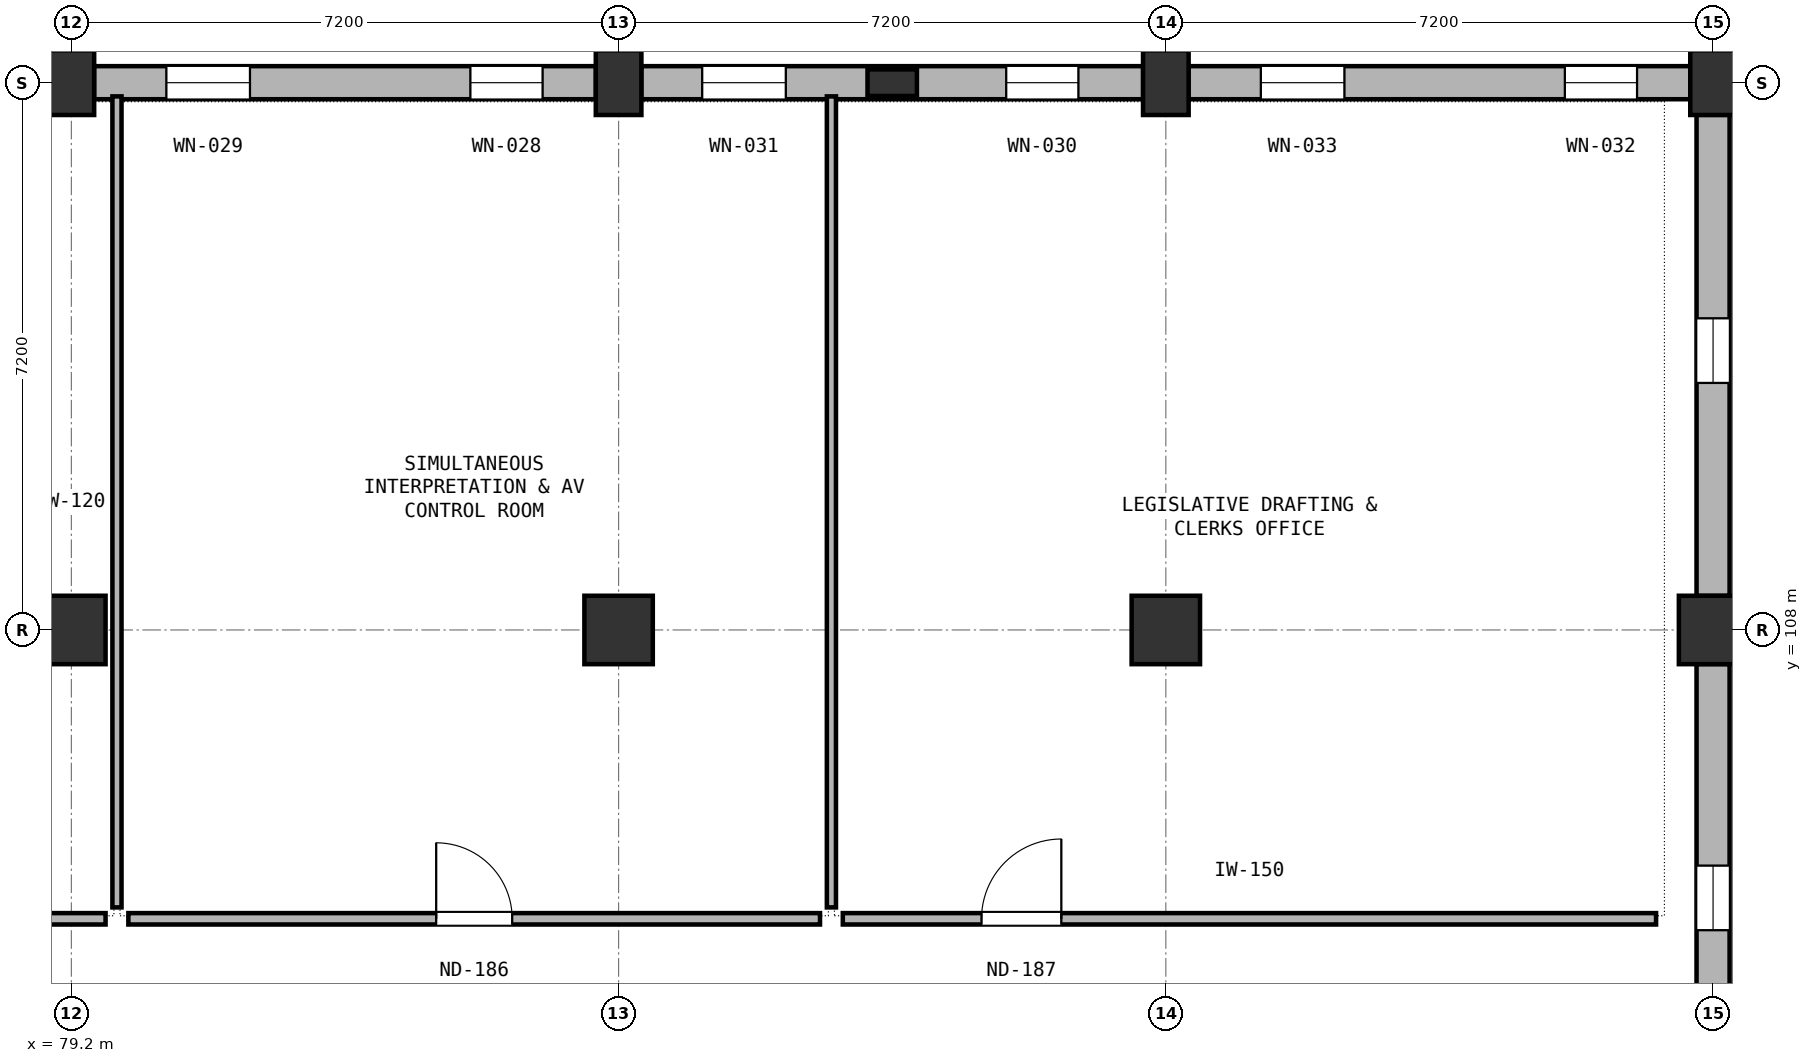
"""IFC4 building model, lengths in metres.
Left out: names, types, materials, properties, quantities, classifications, styles, units other than length and angle.
Written with IfcOpenShell. Run it as: python <this file> out.ifc"""

import sys

from ifc_helpers import new_model, si_unit, direction, frame, frame_2d, origin, origin_2d, place, context, subcontext, project, spatial, rectangle, extrude, element, fill, save


model = new_model("IFC4")
c1 = context("Model", 3, precision=1e-05, world=origin(), true_north=direction((0.0, 1.0)))
c2 = subcontext(c1, "Body", "Model", "MODEL_VIEW")
j1 = project(units=[si_unit("LENGTHUNIT", "METRE"), si_unit("PLANEANGLEUNIT", "RADIAN")], contexts=[c1])
p1 = place(None, origin())
s1 = spatial("IfcSite", under=j1, at=p1, CompositionType="ELEMENT")
p2 = place(p1, origin())
s2 = spatial("IfcBuilding", under=s1, at=p2, CompositionType="ELEMENT")
p3 = place(p2, frame((0.0, 0.0, 5.4)))
s3 = spatial("IfcBuildingStorey", under=s2, at=p3, CompositionType="ELEMENT", Elevation=5.4)
p4 = place(p3, frame((79.2, 108.0, 0.0), z_axis=(0.0, 0.0, 1.0), x_axis=(1.0, 0.0, 0.0)))
e1 = element("IfcColumn", 1, at=p4, inside=s3, PredefinedType="COLUMN", context=c2, shape_type="SweptSolid", body=[
    extrude(rectangle(XDim=0.9, YDim=0.9, at=origin_2d()), origin(), (0.0, 0.0, 1.0), 4.8),
])
p5 = place(p3, frame((79.2, 115.2, 0.0), z_axis=(0.0, 0.0, 1.0), x_axis=(1.0, 0.0, 0.0)))
e2 = element("IfcColumn", 2, at=p5, inside=s3, PredefinedType="COLUMN", context=c2, shape_type="SweptSolid", body=[
    extrude(rectangle(XDim=0.6, YDim=0.85, at=origin_2d()), origin(), (0.0, 0.0, 1.0), 4.8),
])
p6 = place(p3, frame((86.4, 108.0, 0.0), z_axis=(0.0, 0.0, 1.0), x_axis=(1.0, 0.0, 0.0)))
e3 = element("IfcColumn", 3, at=p6, inside=s3, PredefinedType="COLUMN", context=c2, shape_type="SweptSolid", body=[
    extrude(rectangle(XDim=0.9, YDim=0.9, at=origin_2d()), origin(), (0.0, 0.0, 1.0), 4.8),
])
p7 = place(p3, frame((86.4, 115.2, 0.0), z_axis=(0.0, 0.0, 1.0), x_axis=(1.0, 0.0, 0.0)))
e4 = element("IfcColumn", 4, at=p7, inside=s3, PredefinedType="COLUMN", context=c2, shape_type="SweptSolid", body=[
    extrude(rectangle(XDim=0.6, YDim=0.85, at=origin_2d()), origin(), (0.0, 0.0, 1.0), 4.8),
])
p8 = place(p3, frame((93.6, 108.0, 0.0), z_axis=(0.0, 0.0, 1.0), x_axis=(1.0, 0.0, 0.0)))
e5 = element("IfcColumn", 5, at=p8, inside=s3, PredefinedType="COLUMN", context=c2, shape_type="SweptSolid", body=[
    extrude(rectangle(XDim=0.9, YDim=0.9, at=origin_2d()), origin(), (0.0, 0.0, 1.0), 4.8),
])
p9 = place(p3, frame((93.6, 115.2, 0.0), z_axis=(0.0, 0.0, 1.0), x_axis=(1.0, 0.0, 0.0)))
e6 = element("IfcColumn", 6, at=p9, inside=s3, PredefinedType="COLUMN", context=c2, shape_type="SweptSolid", body=[
    extrude(rectangle(XDim=0.6, YDim=0.85, at=origin_2d()), origin(), (0.0, 0.0, 1.0), 4.8),
])
p10 = place(p3, frame((100.8, 108.0, 0.0), z_axis=(0.0, 0.0, 1.0), x_axis=(1.0, 0.0, 0.0)))
e7 = element("IfcColumn", 7, at=p10, inside=s3, PredefinedType="COLUMN", context=c2, shape_type="SweptSolid", body=[
    extrude(rectangle(XDim=0.9, YDim=0.9, at=origin_2d()), origin(), (0.0, 0.0, 1.0), 4.8),
])
p11 = place(p3, frame((100.8, 115.2, 0.0), z_axis=(0.0, 0.0, 1.0), x_axis=(1.0, 0.0, 0.0)))
e8 = element("IfcColumn", 8, at=p11, inside=s3, PredefinedType="COLUMN", context=c2, shape_type="SweptSolid", body=[
    extrude(rectangle(XDim=0.6, YDim=0.85, at=origin_2d()), origin(), (0.0, 0.0, 1.0), 4.8),
])
p12 = place(p3, frame((90.0, 115.2, 0.0), z_axis=(0.0, 0.0, 1.0), x_axis=(1.0, 0.0, 0.0)))
e9 = element("IfcColumn", 9, at=p12, inside=s3, PredefinedType="PILASTER", context=c2, shape_type="SweptSolid", body=[
    extrude(rectangle(XDim=0.65, YDim=0.35, at=origin_2d()), origin(), (0.0, 0.0, 1.0), 4.8),
])
p13 = place(p3, frame((86.102, 115.2, 0.0), z_axis=(0.0, 0.0, 1.0), x_axis=(-1.0, 0.0, 0.0)))
e10 = element("IfcWall", 10, at=p13, inside=s3, PredefinedType="SOLIDWALL", context=c2, shape_type="SweptSolid", body=[
    extrude(rectangle(XDim=6.604, YDim=0.435, at=frame_2d((3.302, 0.0))), origin(), (0.0, 0.0, 1.0), 3.5),
])
p14 = place(p13, frame((0.702, 0.0, 0.7)))
e11 = element("IfcOpeningElement", 11, at=p14, cuts=e10, PredefinedType="OPENING", context=c2, shape_type="SweptSolid", body=[
    extrude(rectangle(XDim=0.95, YDim=2.6, at=frame_2d((0.475, 1.3))), frame((0.0, 0.228, 0.0), z_axis=(0.0, -1.0, 0.0), x_axis=(1.0, 0.0, 0.0)), (0.0, 0.0, 1.0), 0.455),
])
p15 = place(p13, frame((4.552, 0.0, 0.7)))
e12 = element("IfcOpeningElement", 12, at=p15, cuts=e10, PredefinedType="OPENING", context=c2, shape_type="SweptSolid", body=[
    extrude(rectangle(XDim=1.1, YDim=2.6, at=frame_2d((0.55, 1.3))), frame((0.0, 0.228, 0.0), z_axis=(0.0, -1.0, 0.0), x_axis=(1.0, 0.0, 0.0)), (0.0, 0.0, 1.0), 0.455),
])
p16 = place(p3, frame((93.302, 115.2, 0.0), z_axis=(0.0, 0.0, 1.0), x_axis=(-1.0, 0.0, 0.0)))
e13 = element("IfcWall", 13, at=p16, inside=s3, PredefinedType="SOLIDWALL", context=c2, shape_type="SweptSolid", body=[
    extrude(rectangle(XDim=6.604, YDim=0.435, at=frame_2d((3.302, 0.0))), origin(), (0.0, 0.0, 1.0), 3.5),
])
p17 = place(p16, frame((0.852, 0.0, 0.7)))
e14 = element("IfcOpeningElement", 14, at=p17, cuts=e13, PredefinedType="OPENING", context=c2, shape_type="SweptSolid", body=[
    extrude(rectangle(XDim=0.95, YDim=2.6, at=frame_2d((0.475, 1.3))), frame((0.0, 0.228, 0.0), z_axis=(0.0, -1.0, 0.0), x_axis=(1.0, 0.0, 0.0)), (0.0, 0.0, 1.0), 0.455),
])
p18 = place(p16, frame((4.702, 0.0, 0.7)))
e15 = element("IfcOpeningElement", 15, at=p18, cuts=e13, PredefinedType="OPENING", context=c2, shape_type="SweptSolid", body=[
    extrude(rectangle(XDim=1.1, YDim=2.6, at=frame_2d((0.55, 1.3))), frame((0.0, 0.228, 0.0), z_axis=(0.0, -1.0, 0.0), x_axis=(1.0, 0.0, 0.0)), (0.0, 0.0, 1.0), 0.455),
])
p19 = place(p3, frame((100.502, 115.2, 0.0), z_axis=(0.0, 0.0, 1.0), x_axis=(-1.0, 0.0, 0.0)))
e16 = element("IfcWall", 16, at=p19, inside=s3, PredefinedType="SOLIDWALL", context=c2, shape_type="SweptSolid", body=[
    extrude(rectangle(XDim=6.604, YDim=0.435, at=frame_2d((3.302, 0.0))), origin(), (0.0, 0.0, 1.0), 3.5),
])
p20 = place(p19, frame((0.702, 0.0, 0.7)))
e17 = element("IfcOpeningElement", 17, at=p20, cuts=e16, PredefinedType="OPENING", context=c2, shape_type="SweptSolid", body=[
    extrude(rectangle(XDim=0.95, YDim=2.6, at=frame_2d((0.475, 1.3))), frame((0.0, 0.228, 0.0), z_axis=(0.0, -1.0, 0.0), x_axis=(1.0, 0.0, 0.0)), (0.0, 0.0, 1.0), 0.455),
])
p21 = place(p19, frame((4.552, 0.0, 0.7)))
e18 = element("IfcOpeningElement", 18, at=p21, cuts=e16, PredefinedType="OPENING", context=c2, shape_type="SweptSolid", body=[
    extrude(rectangle(XDim=1.1, YDim=2.6, at=frame_2d((0.55, 1.3))), frame((0.0, 0.228, 0.0), z_axis=(0.0, -1.0, 0.0), x_axis=(1.0, 0.0, 0.0)), (0.0, 0.0, 1.0), 0.455),
])
p22 = place(p3, frame((100.8, 107.552, 0.0), z_axis=(0.0, 0.0, 1.0), x_axis=(0.0, -1.0, 0.0)))
e19 = element("IfcWall", 19, at=p22, inside=s3, PredefinedType="SOLIDWALL", context=c2, shape_type="SweptSolid", body=[
    extrude(rectangle(XDim=6.304, YDim=0.435, at=frame_2d((3.152, 0.0))), origin(), (0.0, 0.0, 1.0), 3.5),
])
p23 = place(p22, frame((2.652, 0.0, 0.7)))
e20 = element("IfcOpeningElement", 20, at=p23, cuts=e19, PredefinedType="OPENING", context=c2, shape_type="SweptSolid", body=[
    extrude(rectangle(XDim=0.85, YDim=2.2, at=frame_2d((0.425, 1.1))), frame((0.0, 0.228, 0.0), z_axis=(0.0, -1.0, 0.0), x_axis=(1.0, 0.0, 0.0)), (0.0, 0.0, 1.0), 0.455),
])
p24 = place(p3, frame((100.8, 114.777, 0.0), z_axis=(0.0, 0.0, 1.0), x_axis=(0.0, -1.0, 0.0)))
e21 = element("IfcWall", 21, at=p24, inside=s3, PredefinedType="SOLIDWALL", context=c2, shape_type="SweptSolid", body=[
    extrude(rectangle(XDim=6.329, YDim=0.435, at=frame_2d((3.165, 0.0))), origin(), (0.0, 0.0, 1.0), 3.5),
])
p25 = place(p24, frame((2.677, 0.0, 0.7)))
e22 = element("IfcOpeningElement", 22, at=p25, cuts=e21, PredefinedType="OPENING", context=c2, shape_type="SweptSolid", body=[
    extrude(rectangle(XDim=0.85, YDim=2.2, at=frame_2d((0.425, 1.1))), frame((0.0, 0.228, 0.0), z_axis=(0.0, -1.0, 0.0), x_axis=(1.0, 0.0, 0.0)), (0.0, 0.0, 1.0), 0.455),
])
p26 = place(p3, frame((69.15, 104.2, 0.0), z_axis=(0.0, 0.0, 1.0), x_axis=(1.0, 0.0, 0.0)))
e23 = element("IfcWall", 23, at=p26, inside=s3, PredefinedType="PARTITIONING", context=c2, shape_type="SweptSolid", body=[
    extrude(rectangle(XDim=10.5, YDim=0.15, at=frame_2d((5.25, 0.0))), origin(), (0.0, 0.0, 1.0), 3.52),
])
p27 = place(p26, frame((4.45, 0.0, 0.0)))
e24 = element("IfcOpeningElement", 24, at=p27, cuts=e23, PredefinedType="OPENING", context=c2, shape_type="SweptSolid", body=[
    extrude(rectangle(XDim=1.6, YDim=2.2, at=frame_2d((0.8, 1.1))), frame((0.0, 0.085, 0.0), z_axis=(0.0, -1.0, 0.0), x_axis=(1.0, 0.0, 0.0)), (0.0, 0.0, 1.0), 0.17),
])
p28 = place(p3, frame((79.95, 104.2, 0.0), z_axis=(0.0, 0.0, 1.0), x_axis=(1.0, 0.0, 0.0)))
e25 = element("IfcWall", 25, at=p28, inside=s3, PredefinedType="PARTITIONING", context=c2, shape_type="SweptSolid", body=[
    extrude(rectangle(XDim=9.1, YDim=0.15, at=frame_2d((4.55, 0.0))), origin(), (0.0, 0.0, 1.0), 3.52),
])
p29 = place(p28, frame((4.05, 0.0, 0.0)))
e26 = element("IfcOpeningElement", 26, at=p29, cuts=e25, PredefinedType="OPENING", context=c2, shape_type="SweptSolid", body=[
    extrude(rectangle(XDim=1.0, YDim=2.15, at=frame_2d((0.5, 1.075))), frame((0.0, 0.085, 0.0), z_axis=(0.0, -1.0, 0.0), x_axis=(1.0, 0.0, 0.0)), (0.0, 0.0, 1.0), 0.17),
])
p30 = place(p3, frame((79.8, 104.35, 0.0), z_axis=(0.0, 0.0, 1.0), x_axis=(0.0, 1.0, 0.0)))
e27 = element("IfcWall", 27, at=p30, inside=s3, PredefinedType="PARTITIONING", context=c2, shape_type="SweptSolid", body=[
    extrude(rectangle(XDim=10.67, YDim=0.12, at=frame_2d((5.335, 0.0))), origin(), (0.0, 0.0, 1.0), 3.52),
])
p31 = place(p3, frame((89.35, 104.2, 0.0), z_axis=(0.0, 0.0, 1.0), x_axis=(1.0, 0.0, 0.0)))
e28 = element("IfcWall", 28, at=p31, inside=s3, PredefinedType="PARTITIONING", context=c2, shape_type="SweptSolid", body=[
    extrude(rectangle(XDim=10.7, YDim=0.15, at=frame_2d((5.35, 0.0))), origin(), (0.0, 0.0, 1.0), 3.52),
])
p32 = place(p31, frame((1.825, 0.0, 0.0)))
e29 = element("IfcOpeningElement", 29, at=p32, cuts=e28, PredefinedType="OPENING", context=c2, shape_type="SweptSolid", body=[
    extrude(rectangle(XDim=1.05, YDim=2.15, at=frame_2d((0.525, 1.075))), frame((0.0, 0.085, 0.0), z_axis=(0.0, -1.0, 0.0), x_axis=(1.0, 0.0, 0.0)), (0.0, 0.0, 1.0), 0.17),
])
p33 = place(p3, frame((89.2, 104.35, 0.0), z_axis=(0.0, 0.0, 1.0), x_axis=(0.0, 1.0, 0.0)))
e30 = element("IfcWall", 30, at=p33, inside=s3, PredefinedType="PARTITIONING", context=c2, shape_type="SweptSolid", body=[
    extrude(rectangle(XDim=10.67, YDim=0.12, at=frame_2d((5.335, 0.0))), origin(), (0.0, 0.0, 1.0), 3.52),
])
p34 = place(p14, origin())
e31 = element("IfcWindow", 31, at=p34, inside=s3, PartitioningType="SINGLE_PANEL", PredefinedType="WINDOW", context=c2, shape_type="SweptSolid", body=[
    extrude(rectangle(XDim=0.95, YDim=2.6, at=frame_2d((0.475, 1.3))), frame((0.0, 0.03, 0.0), z_axis=(0.0, -1.0, 0.0), x_axis=(1.0, 0.0, 0.0)), (0.0, 0.0, 1.0), 0.06),
])
fill(e11, e31)
p35 = place(p15, origin())
e32 = element("IfcWindow", 32, at=p35, inside=s3, PartitioningType="SINGLE_PANEL", PredefinedType="WINDOW", context=c2, shape_type="SweptSolid", body=[
    extrude(rectangle(XDim=1.1, YDim=2.6, at=frame_2d((0.55, 1.3))), frame((0.0, 0.03, 0.0), z_axis=(0.0, -1.0, 0.0), x_axis=(1.0, 0.0, 0.0)), (0.0, 0.0, 1.0), 0.06),
])
fill(e12, e32)
p36 = place(p17, origin())
e33 = element("IfcWindow", 33, at=p36, inside=s3, PartitioningType="SINGLE_PANEL", PredefinedType="WINDOW", context=c2, shape_type="SweptSolid", body=[
    extrude(rectangle(XDim=0.95, YDim=2.6, at=frame_2d((0.475, 1.3))), frame((0.0, 0.03, 0.0), z_axis=(0.0, -1.0, 0.0), x_axis=(1.0, 0.0, 0.0)), (0.0, 0.0, 1.0), 0.06),
])
fill(e14, e33)
p37 = place(p18, origin())
e34 = element("IfcWindow", 34, at=p37, inside=s3, PartitioningType="SINGLE_PANEL", PredefinedType="WINDOW", context=c2, shape_type="SweptSolid", body=[
    extrude(rectangle(XDim=1.1, YDim=2.6, at=frame_2d((0.55, 1.3))), frame((0.0, 0.03, 0.0), z_axis=(0.0, -1.0, 0.0), x_axis=(1.0, 0.0, 0.0)), (0.0, 0.0, 1.0), 0.06),
])
fill(e15, e34)
p38 = place(p20, origin())
e35 = element("IfcWindow", 35, at=p38, inside=s3, PartitioningType="SINGLE_PANEL", PredefinedType="WINDOW", context=c2, shape_type="SweptSolid", body=[
    extrude(rectangle(XDim=0.95, YDim=2.6, at=frame_2d((0.475, 1.3))), frame((0.0, 0.03, 0.0), z_axis=(0.0, -1.0, 0.0), x_axis=(1.0, 0.0, 0.0)), (0.0, 0.0, 1.0), 0.06),
])
fill(e17, e35)
p39 = place(p21, origin())
e36 = element("IfcWindow", 36, at=p39, inside=s3, PartitioningType="SINGLE_PANEL", PredefinedType="WINDOW", context=c2, shape_type="SweptSolid", body=[
    extrude(rectangle(XDim=1.1, YDim=2.6, at=frame_2d((0.55, 1.3))), frame((0.0, 0.03, 0.0), z_axis=(0.0, -1.0, 0.0), x_axis=(1.0, 0.0, 0.0)), (0.0, 0.0, 1.0), 0.06),
])
fill(e18, e36)
p40 = place(p23, origin())
e37 = element("IfcWindow", 37, at=p40, inside=s3, PartitioningType="SINGLE_PANEL", PredefinedType="WINDOW", context=c2, shape_type="SweptSolid", body=[
    extrude(rectangle(XDim=0.85, YDim=2.2, at=frame_2d((0.425, 1.1))), frame((0.0, 0.03, 0.0), z_axis=(0.0, -1.0, 0.0), x_axis=(1.0, 0.0, 0.0)), (0.0, 0.0, 1.0), 0.06),
])
fill(e20, e37)
p41 = place(p25, origin())
e38 = element("IfcWindow", 38, at=p41, inside=s3, PartitioningType="SINGLE_PANEL", PredefinedType="WINDOW", context=c2, shape_type="SweptSolid", body=[
    extrude(rectangle(XDim=0.85, YDim=2.2, at=frame_2d((0.425, 1.1))), frame((0.0, 0.03, 0.0), z_axis=(0.0, -1.0, 0.0), x_axis=(1.0, 0.0, 0.0)), (0.0, 0.0, 1.0), 0.06),
])
fill(e22, e38)
p42 = place(p29, origin())
e39 = element("IfcDoor", 39, at=p42, inside=s3, OperationType="SINGLE_SWING_LEFT", PredefinedType="DOOR", context=c2, shape_type="SweptSolid", body=[
    extrude(rectangle(XDim=1.0, YDim=2.15, at=frame_2d((0.5, 1.075))), frame((0.0, 0.025, 0.0), z_axis=(0.0, -1.0, 0.0), x_axis=(1.0, 0.0, 0.0)), (0.0, 0.0, 1.0), 0.05),
])
fill(e26, e39)
p43 = place(p32, origin())
e40 = element("IfcDoor", 40, at=p43, inside=s3, OperationType="SINGLE_SWING_RIGHT", PredefinedType="DOOR", context=c2, shape_type="SweptSolid", body=[
    extrude(rectangle(XDim=1.05, YDim=2.15, at=frame_2d((0.525, 1.075))), frame((0.0, 0.025, 0.0), z_axis=(0.0, -1.0, 0.0), x_axis=(1.0, 0.0, 0.0)), (0.0, 0.0, 1.0), 0.05),
])
fill(e29, e40)
save(model, sys.argv[1])
